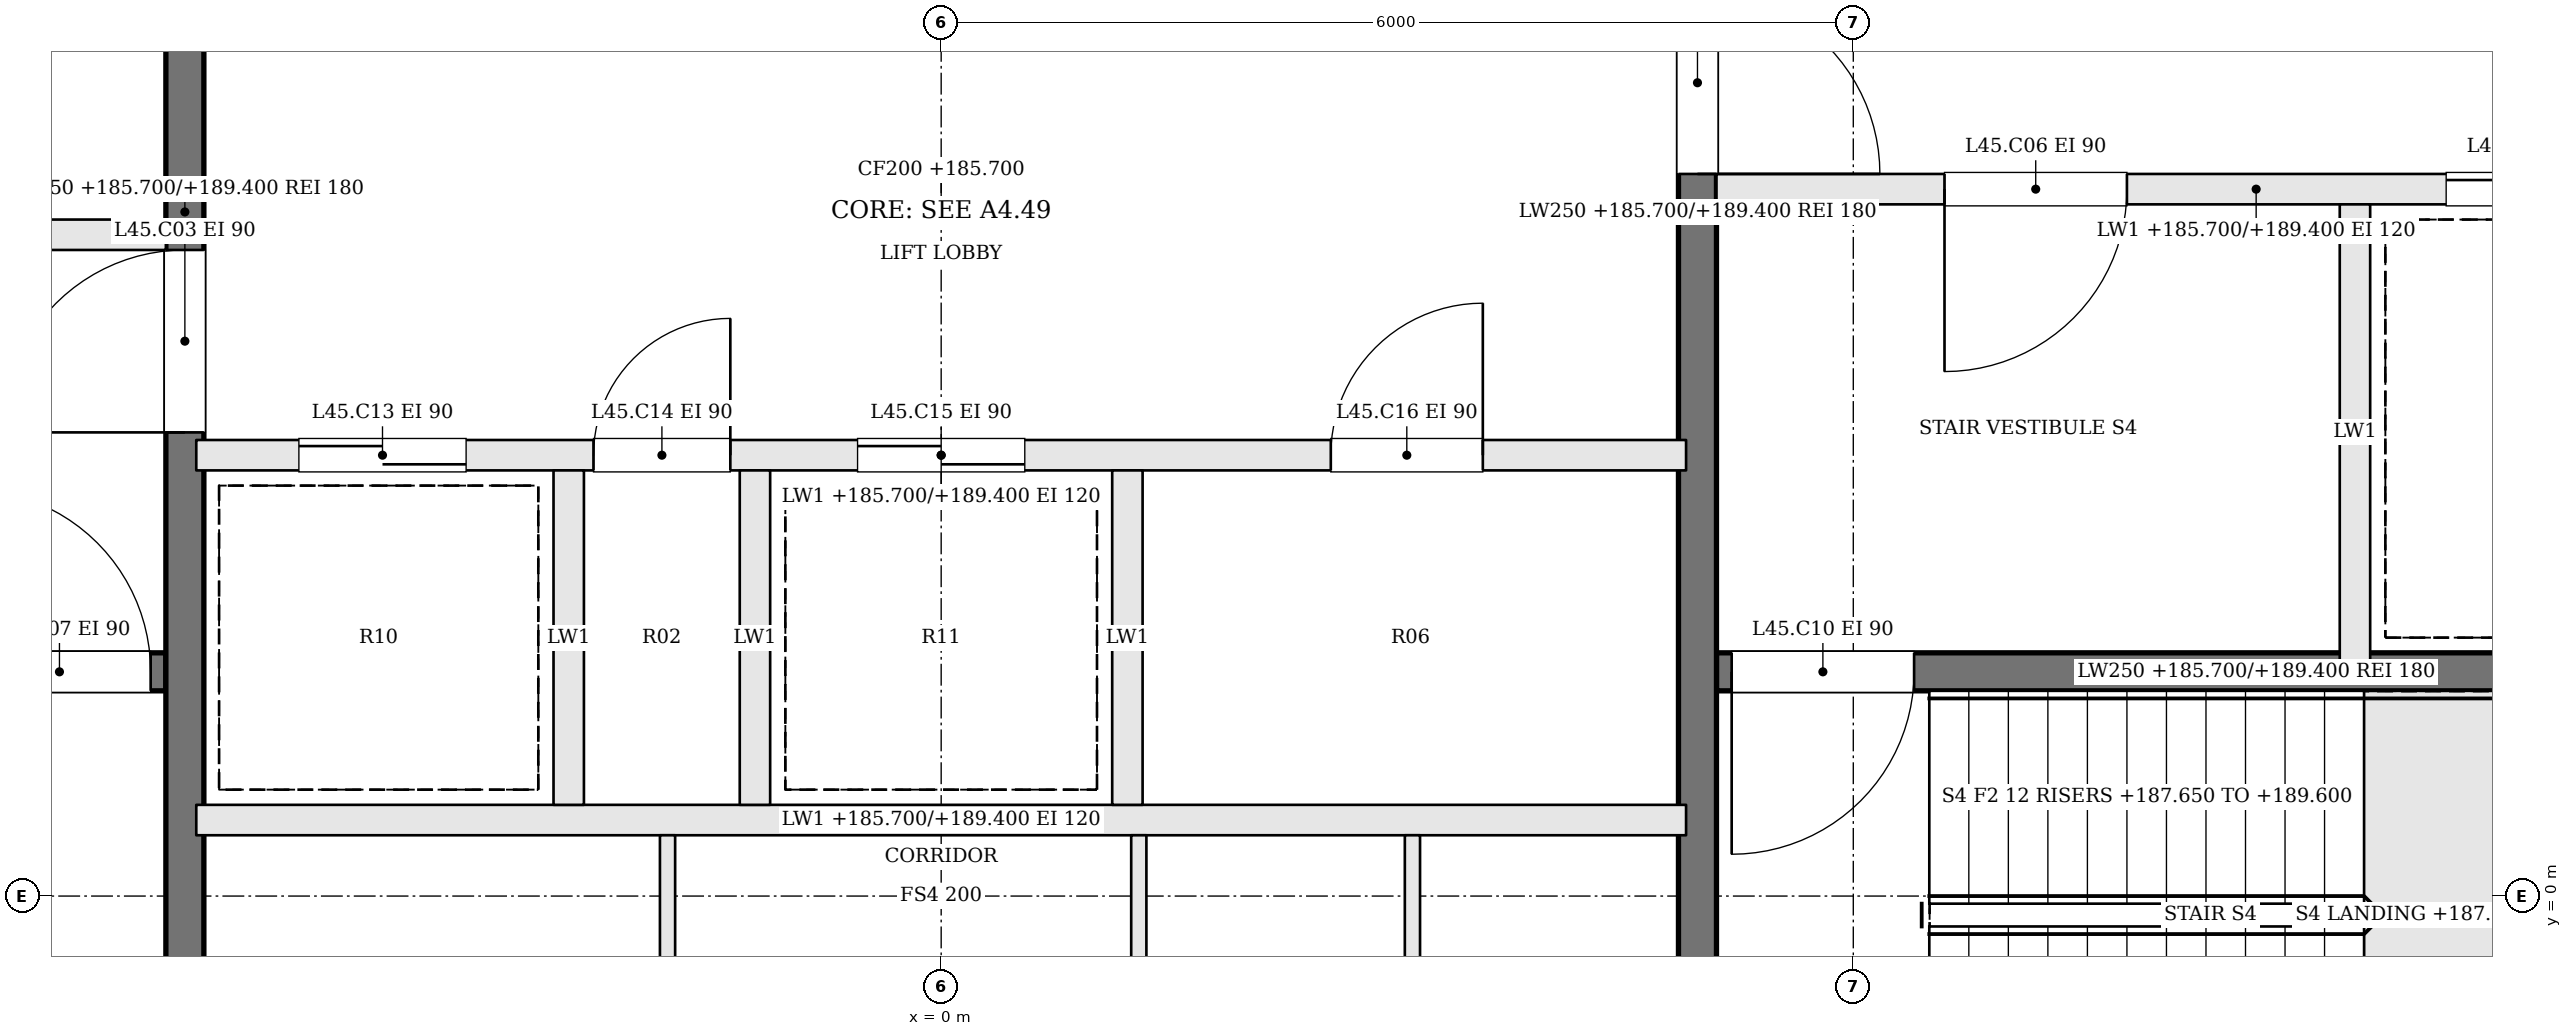
"""IFC4 building model, lengths in metres.
Left out: names, types, materials, properties, quantities, classifications, styles, units other than length and angle.
Written with IfcOpenShell. Run it as: python <this file> out.ifc"""

import sys

from ifc_helpers import new_model, si_unit, direction, frame, frame_2d, origin, place, context, subcontext, project, spatial, rectangle, extrude, element, fill, save


model = new_model("IFC4")
c1 = context("Model", 3, precision=1e-05, world=origin(), true_north=direction((0.0, 1.0)))
c2 = subcontext(c1, "Body", "Model", "MODEL_VIEW")
j1 = project(units=[si_unit("LENGTHUNIT", "METRE"), si_unit("PLANEANGLEUNIT", "RADIAN")], contexts=[c1])
p1 = place(None, origin())
s1 = spatial("IfcSite", under=j1, at=p1, CompositionType="ELEMENT")
p2 = place(p1, origin())
s2 = spatial("IfcBuilding", under=s1, at=p2, CompositionType="ELEMENT")
p3 = place(p2, frame((0.0, 0.0, 185.7)))
s3 = spatial("IfcBuildingStorey", under=s2, at=p3, CompositionType="ELEMENT", Elevation=185.7)
p4 = place(p3, frame((-12.2, 1.475, 0.0), z_axis=(0.0, 0.0, 1.0), x_axis=(1.0, 0.0, 0.0)))
e1 = element("IfcWall", 1, at=p4, inside=s3, PredefinedType="SOLIDWALL", context=c2, shape_type="SweptSolid", body=[
    extrude(rectangle(XDim=7.1, YDim=0.25, at=frame_2d((3.55, 0.0))), origin(), (0.0, 0.0, 1.0), 3.7),
])
p5 = place(p4, frame((5.8, 0.0, 0.0)))
e2 = element("IfcOpeningElement", 2, at=p5, cuts=e1, PredefinedType="OPENING", context=c2, shape_type="SweptSolid", body=[
    extrude(rectangle(XDim=1.2, YDim=2.1, at=frame_2d((0.6, 1.05))), frame((0.0, 0.135, 0.0), z_axis=(0.0, -1.0, 0.0), x_axis=(1.0, 0.0, 0.0)), (0.0, 0.0, 1.0), 0.27),
])
p6 = place(p3, frame((-12.2, 4.35, 0.0), z_axis=(0.0, 0.0, 1.0), x_axis=(1.0, 0.0, 0.0)))
e3 = element("IfcWall", 3, at=p6, inside=s3, PredefinedType="SOLIDWALL", context=c2, shape_type="SweptSolid", body=[
    extrude(rectangle(XDim=7.1, YDim=0.2, at=frame_2d((3.55, 0.0))), origin(), (0.0, 0.0, 1.0), 3.7),
])
p7 = place(p6, frame((4.4, 0.0, 0.0)))
e4 = element("IfcOpeningElement", 4, at=p7, cuts=e3, PredefinedType="OPENING", context=c2, shape_type="SweptSolid", body=[
    extrude(rectangle(XDim=1.2, YDim=2.1, at=frame_2d((0.6, 1.05))), frame((0.0, 0.11, 0.0), z_axis=(0.0, -1.0, 0.0), x_axis=(1.0, 0.0, 0.0)), (0.0, 0.0, 1.0), 0.22),
])
p8 = place(p6, frame((1.1, 0.0, 0.0)))
e5 = element("IfcOpeningElement", 5, at=p8, cuts=e3, PredefinedType="OPENING", context=c2, shape_type="SweptSolid", body=[
    extrude(rectangle(XDim=1.2, YDim=2.1, at=frame_2d((0.6, 1.05))), frame((0.0, 0.11, 0.0), z_axis=(0.0, -1.0, 0.0), x_axis=(1.0, 0.0, 0.0)), (0.0, 0.0, 1.0), 0.22),
])
p9 = place(p3, frame((12.2, 4.65, 0.0), z_axis=(0.0, 0.0, 1.0), x_axis=(-1.0, 0.0, 0.0)))
e6 = element("IfcWall", 6, at=p9, inside=s3, PredefinedType="SOLIDWALL", context=c2, shape_type="SweptSolid", body=[
    extrude(rectangle(XDim=7.1, YDim=0.2, at=frame_2d((3.55, 0.0))), origin(), (0.0, 0.0, 1.0), 3.7),
])
p10 = place(p9, frame((4.4, 0.0, 0.0)))
e7 = element("IfcOpeningElement", 7, at=p10, cuts=e6, PredefinedType="OPENING", context=c2, shape_type="SweptSolid", body=[
    extrude(rectangle(XDim=1.2, YDim=2.1, at=frame_2d((0.6, 1.05))), frame((0.0, 0.11, 0.0), z_axis=(0.0, -1.0, 0.0), x_axis=(1.0, 0.0, 0.0)), (0.0, 0.0, 1.0), 0.22),
])
p11 = place(p9, frame((1.1, 0.0, 0.0)))
e8 = element("IfcOpeningElement", 8, at=p11, cuts=e6, PredefinedType="OPENING", context=c2, shape_type="SweptSolid", body=[
    extrude(rectangle(XDim=1.2, YDim=2.1, at=frame_2d((0.6, 1.05))), frame((0.0, 0.11, 0.0), z_axis=(0.0, -1.0, 0.0), x_axis=(1.0, 0.0, 0.0)), (0.0, 0.0, 1.0), 0.22),
])
p12 = place(p3, frame((12.2, 1.475, 0.0), z_axis=(0.0, 0.0, 1.0), x_axis=(-1.0, 0.0, 0.0)))
e9 = element("IfcWall", 9, at=p12, inside=s3, PredefinedType="SOLIDWALL", context=c2, shape_type="SweptSolid", body=[
    extrude(rectangle(XDim=7.1, YDim=0.25, at=frame_2d((3.55, 0.0))), origin(), (0.0, 0.0, 1.0), 3.7),
])
p13 = place(p12, frame((5.8, 0.0, 0.0)))
e10 = element("IfcOpeningElement", 10, at=p13, cuts=e9, PredefinedType="OPENING", context=c2, shape_type="SweptSolid", body=[
    extrude(rectangle(XDim=1.2, YDim=2.1, at=frame_2d((0.6, 1.05))), frame((0.0, 0.135, 0.0), z_axis=(0.0, -1.0, 0.0), x_axis=(1.0, 0.0, 0.0)), (0.0, 0.0, 1.0), 0.27),
])
p14 = place(p3, frame((9.3, 4.55, 0.0), z_axis=(0.0, 0.0, 1.0), x_axis=(0.0, -1.0, 0.0)))
e11 = element("IfcWall", 11, at=p14, inside=s3, PredefinedType="SOLIDWALL", context=c2, shape_type="SweptSolid", body=[
    extrude(rectangle(XDim=3.0, YDim=0.2, at=frame_2d((1.5, 0.0))), origin(), (0.0, 0.0, 1.0), 3.7),
])
p15 = place(p3, frame((-4.975, -2.2, 0.0), z_axis=(0.0, 0.0, 1.0), x_axis=(0.0, 1.0, 0.0)))
e12 = element("IfcWall", 12, at=p15, inside=s3, PredefinedType="SOLIDWALL", context=c2, shape_type="SweptSolid", body=[
    extrude(rectangle(XDim=13.4, YDim=0.25, at=frame_2d((6.7, 0.0))), origin(), (0.0, 0.0, 1.0), 3.7),
])
p16 = place(p15, frame((5.25, 0.0, 0.0)))
e13 = element("IfcOpeningElement", 13, at=p16, cuts=e12, PredefinedType="OPENING", context=c2, shape_type="SweptSolid", body=[
    extrude(rectangle(XDim=1.2, YDim=2.1, at=frame_2d((0.6, 1.05))), frame((0.0, 0.135, 0.0), z_axis=(0.0, -1.0, 0.0), x_axis=(1.0, 0.0, 0.0)), (0.0, 0.0, 1.0), 0.27),
])
p17 = place(p3, frame((4.975, 11.2, 0.0), z_axis=(0.0, 0.0, 1.0), x_axis=(0.0, -1.0, 0.0)))
e14 = element("IfcWall", 14, at=p17, inside=s3, PredefinedType="SOLIDWALL", context=c2, shape_type="SweptSolid", body=[
    extrude(rectangle(XDim=13.4, YDim=0.25, at=frame_2d((6.7, 0.0))), origin(), (0.0, 0.0, 1.0), 3.7),
])
p18 = place(p17, frame((5.25, 0.0, 0.0)))
e15 = element("IfcOpeningElement", 15, at=p18, cuts=e14, PredefinedType="OPENING", context=c2, shape_type="SweptSolid", body=[
    extrude(rectangle(XDim=1.2, YDim=2.1, at=frame_2d((0.6, 1.05))), frame((0.0, 0.135, 0.0), z_axis=(0.0, -1.0, 0.0), x_axis=(1.0, 0.0, 0.0)), (0.0, 0.0, 1.0), 0.27),
])
p19 = place(p3, frame((-4.9, 0.5, 0.0), z_axis=(0.0, 0.0, 1.0), x_axis=(1.0, 0.0, 0.0)))
e16 = element("IfcWall", 16, at=p19, inside=s3, PredefinedType="SOLIDWALL", context=c2, shape_type="SweptSolid", body=[
    extrude(rectangle(XDim=9.8, YDim=0.2, at=frame_2d((4.9, 0.0))), origin(), (0.0, 0.0, 1.0), 3.7),
])
p20 = place(p3, frame((-4.9, 2.9, 0.0), z_axis=(0.0, 0.0, 1.0), x_axis=(1.0, 0.0, 0.0)))
e17 = element("IfcWall", 17, at=p20, inside=s3, PredefinedType="SOLIDWALL", context=c2, shape_type="SweptSolid", body=[
    extrude(rectangle(XDim=9.8, YDim=0.2, at=frame_2d((4.9, 0.0))), origin(), (0.0, 0.0, 1.0), 3.7),
])
p21 = place(p20, frame((0.675, 0.0, 0.0)))
e18 = element("IfcOpeningElement", 18, at=p21, cuts=e17, PredefinedType="OPENING", context=c2, shape_type="SweptSolid", body=[
    extrude(rectangle(XDim=1.1, YDim=2.1, at=frame_2d((0.55, 1.05))), frame((0.0, 0.11, 0.0), z_axis=(0.0, -1.0, 0.0), x_axis=(1.0, 0.0, 0.0)), (0.0, 0.0, 1.0), 0.22),
])
p22 = place(p20, frame((2.613, 0.0, 0.0)))
e19 = element("IfcOpeningElement", 19, at=p22, cuts=e17, PredefinedType="OPENING", context=c2, shape_type="SweptSolid", body=[
    extrude(rectangle(XDim=0.9, YDim=2.1, at=frame_2d((0.45, 1.05))), frame((0.0, 0.11, 0.0), z_axis=(0.0, -1.0, 0.0), x_axis=(1.0, 0.0, 0.0)), (0.0, 0.0, 1.0), 0.22),
])
p23 = place(p20, frame((4.35, 0.0, 0.0)))
e20 = element("IfcOpeningElement", 20, at=p23, cuts=e17, PredefinedType="OPENING", context=c2, shape_type="SweptSolid", body=[
    extrude(rectangle(XDim=1.1, YDim=2.1, at=frame_2d((0.55, 1.05))), frame((0.0, 0.11, 0.0), z_axis=(0.0, -1.0, 0.0), x_axis=(1.0, 0.0, 0.0)), (0.0, 0.0, 1.0), 0.22),
])
p24 = place(p20, frame((7.463, 0.0, 0.0)))
e21 = element("IfcOpeningElement", 21, at=p24, cuts=e17, PredefinedType="OPENING", context=c2, shape_type="SweptSolid", body=[
    extrude(rectangle(XDim=1.0, YDim=2.1, at=frame_2d((0.5, 1.05))), frame((0.0, 0.11, 0.0), z_axis=(0.0, -1.0, 0.0), x_axis=(1.0, 0.0, 0.0)), (0.0, 0.0, 1.0), 0.22),
])
for number, where, z_axis, x_axis in (
    (22, (-2.45, 0.6, 0.0), (0.0, 0.0, 1.0), (0.0, 1.0, 0.0)),
    (23, (-1.225, 0.6, 0.0), (0.0, 0.0, 1.0), (0.0, 1.0, 0.0)),
    (24, (1.225, 0.6, 0.0), (0.0, 0.0, 1.0), (0.0, 1.0, 0.0)),
):
    element("IfcWall", number, at=place(p3, frame(where, z_axis=z_axis, x_axis=x_axis)), inside=s3, PredefinedType="SOLIDWALL", context=c2, shape_type="SweptSolid", body=[
        extrude(rectangle(XDim=2.2, YDim=0.2, at=frame_2d((1.1, 0.0))), origin(), (0.0, 0.0, 1.0), 3.7),
    ])
for number, where, z_axis, x_axis in (
    (25, (-1.8, -2.2, 0.0), (0.0, 0.0, 1.0), (0.0, 1.0, 0.0)),
    (26, (1.3, -2.2, 0.0), (0.0, 0.0, 1.0), (0.0, 1.0, 0.0)),
    (27, (3.1, -2.2, 0.0), (0.0, 0.0, 1.0), (0.0, 1.0, 0.0)),
):
    element("IfcWall", number, at=place(p3, frame(where, z_axis=z_axis, x_axis=x_axis)), inside=s3, PredefinedType="PARTITIONING", context=c2, shape_type="SweptSolid", body=[
        extrude(rectangle(XDim=2.6, YDim=0.1, at=frame_2d((1.3, 0.0))), origin(), (0.0, 0.0, 1.0), 3.7),
    ])
p25 = place(p16, origin())
e28 = element("IfcDoor", 28, at=p25, inside=s3, OperationType="SINGLE_SWING_LEFT", PredefinedType="DOOR", context=c2, shape_type="SweptSolid", body=[
    extrude(rectangle(XDim=1.2, YDim=2.1, at=frame_2d((0.6, 1.05))), frame((0.0, 0.025, 0.0), z_axis=(0.0, -1.0, 0.0), x_axis=(1.0, 0.0, 0.0)), (0.0, 0.0, 1.0), 0.05),
])
fill(e13, e28)
p26 = place(p18, origin())
e29 = element("IfcDoor", 29, at=p26, inside=s3, OperationType="SINGLE_SWING_RIGHT", PredefinedType="DOOR", context=c2, shape_type="SweptSolid", body=[
    extrude(rectangle(XDim=1.2, YDim=2.1, at=frame_2d((0.6, 1.05))), frame((0.0, 0.025, 0.0), z_axis=(0.0, -1.0, 0.0), x_axis=(1.0, 0.0, 0.0)), (0.0, 0.0, 1.0), 0.05),
])
fill(e15, e29)
p27 = place(p10, origin())
e30 = element("IfcDoor", 30, at=p27, inside=s3, OperationType="SINGLE_SWING_RIGHT", PredefinedType="DOOR", context=c2, shape_type="SweptSolid", body=[
    extrude(rectangle(XDim=1.2, YDim=2.1, at=frame_2d((0.6, 1.05))), frame((0.0, 0.025, 0.0), z_axis=(0.0, -1.0, 0.0), x_axis=(1.0, 0.0, 0.0)), (0.0, 0.0, 1.0), 0.05),
])
fill(e7, e30)
p28 = place(p5, origin())
e31 = element("IfcDoor", 31, at=p28, inside=s3, OperationType="SINGLE_SWING_LEFT", PredefinedType="DOOR", context=c2, shape_type="SweptSolid", body=[
    extrude(rectangle(XDim=1.2, YDim=2.1, at=frame_2d((0.6, 1.05))), frame((0.0, 0.025, 0.0), z_axis=(0.0, -1.0, 0.0), x_axis=(1.0, 0.0, 0.0)), (0.0, 0.0, 1.0), 0.05),
])
fill(e2, e31)
p29 = place(p13, origin())
e32 = element("IfcDoor", 32, at=p29, inside=s3, OperationType="SINGLE_SWING_RIGHT", PredefinedType="DOOR", context=c2, shape_type="SweptSolid", body=[
    extrude(rectangle(XDim=1.2, YDim=2.1, at=frame_2d((0.6, 1.05))), frame((0.0, 0.025, 0.0), z_axis=(0.0, -1.0, 0.0), x_axis=(1.0, 0.0, 0.0)), (0.0, 0.0, 1.0), 0.05),
])
fill(e10, e32)
p30 = place(p11, origin())
e33 = element("IfcDoor", 33, at=p30, inside=s3, OperationType="SLIDING_TO_RIGHT", PredefinedType="DOOR", context=c2, shape_type="SweptSolid", body=[
    extrude(rectangle(XDim=1.2, YDim=2.1, at=frame_2d((0.6, 1.05))), frame((0.0, 0.025, 0.0), z_axis=(0.0, -1.0, 0.0), x_axis=(1.0, 0.0, 0.0)), (0.0, 0.0, 1.0), 0.05),
])
fill(e8, e33)
p31 = place(p21, origin())
e34 = element("IfcDoor", 34, at=p31, inside=s3, OperationType="SLIDING_TO_RIGHT", PredefinedType="DOOR", context=c2, shape_type="SweptSolid", body=[
    extrude(rectangle(XDim=1.1, YDim=2.1, at=frame_2d((0.55, 1.05))), frame((0.0, 0.025, 0.0), z_axis=(0.0, -1.0, 0.0), x_axis=(1.0, 0.0, 0.0)), (0.0, 0.0, 1.0), 0.05),
])
fill(e18, e34)
p32 = place(p22, origin())
e35 = element("IfcDoor", 35, at=p32, inside=s3, OperationType="SINGLE_SWING_RIGHT", PredefinedType="DOOR", context=c2, shape_type="SweptSolid", body=[
    extrude(rectangle(XDim=0.9, YDim=2.1, at=frame_2d((0.45, 1.05))), frame((0.0, 0.025, 0.0), z_axis=(0.0, -1.0, 0.0), x_axis=(1.0, 0.0, 0.0)), (0.0, 0.0, 1.0), 0.05),
])
fill(e19, e35)
p33 = place(p23, origin())
e36 = element("IfcDoor", 36, at=p33, inside=s3, OperationType="SLIDING_TO_LEFT", PredefinedType="DOOR", context=c2, shape_type="SweptSolid", body=[
    extrude(rectangle(XDim=1.1, YDim=2.1, at=frame_2d((0.55, 1.05))), frame((0.0, 0.025, 0.0), z_axis=(0.0, -1.0, 0.0), x_axis=(1.0, 0.0, 0.0)), (0.0, 0.0, 1.0), 0.05),
])
fill(e20, e36)
p34 = place(p24, origin())
e37 = element("IfcDoor", 37, at=p34, inside=s3, OperationType="SINGLE_SWING_RIGHT", PredefinedType="DOOR", context=c2, shape_type="SweptSolid", body=[
    extrude(rectangle(XDim=1.0, YDim=2.1, at=frame_2d((0.5, 1.05))), frame((0.0, 0.025, 0.0), z_axis=(0.0, -1.0, 0.0), x_axis=(1.0, 0.0, 0.0)), (0.0, 0.0, 1.0), 0.05),
])
fill(e21, e37)
save(model, sys.argv[1])
